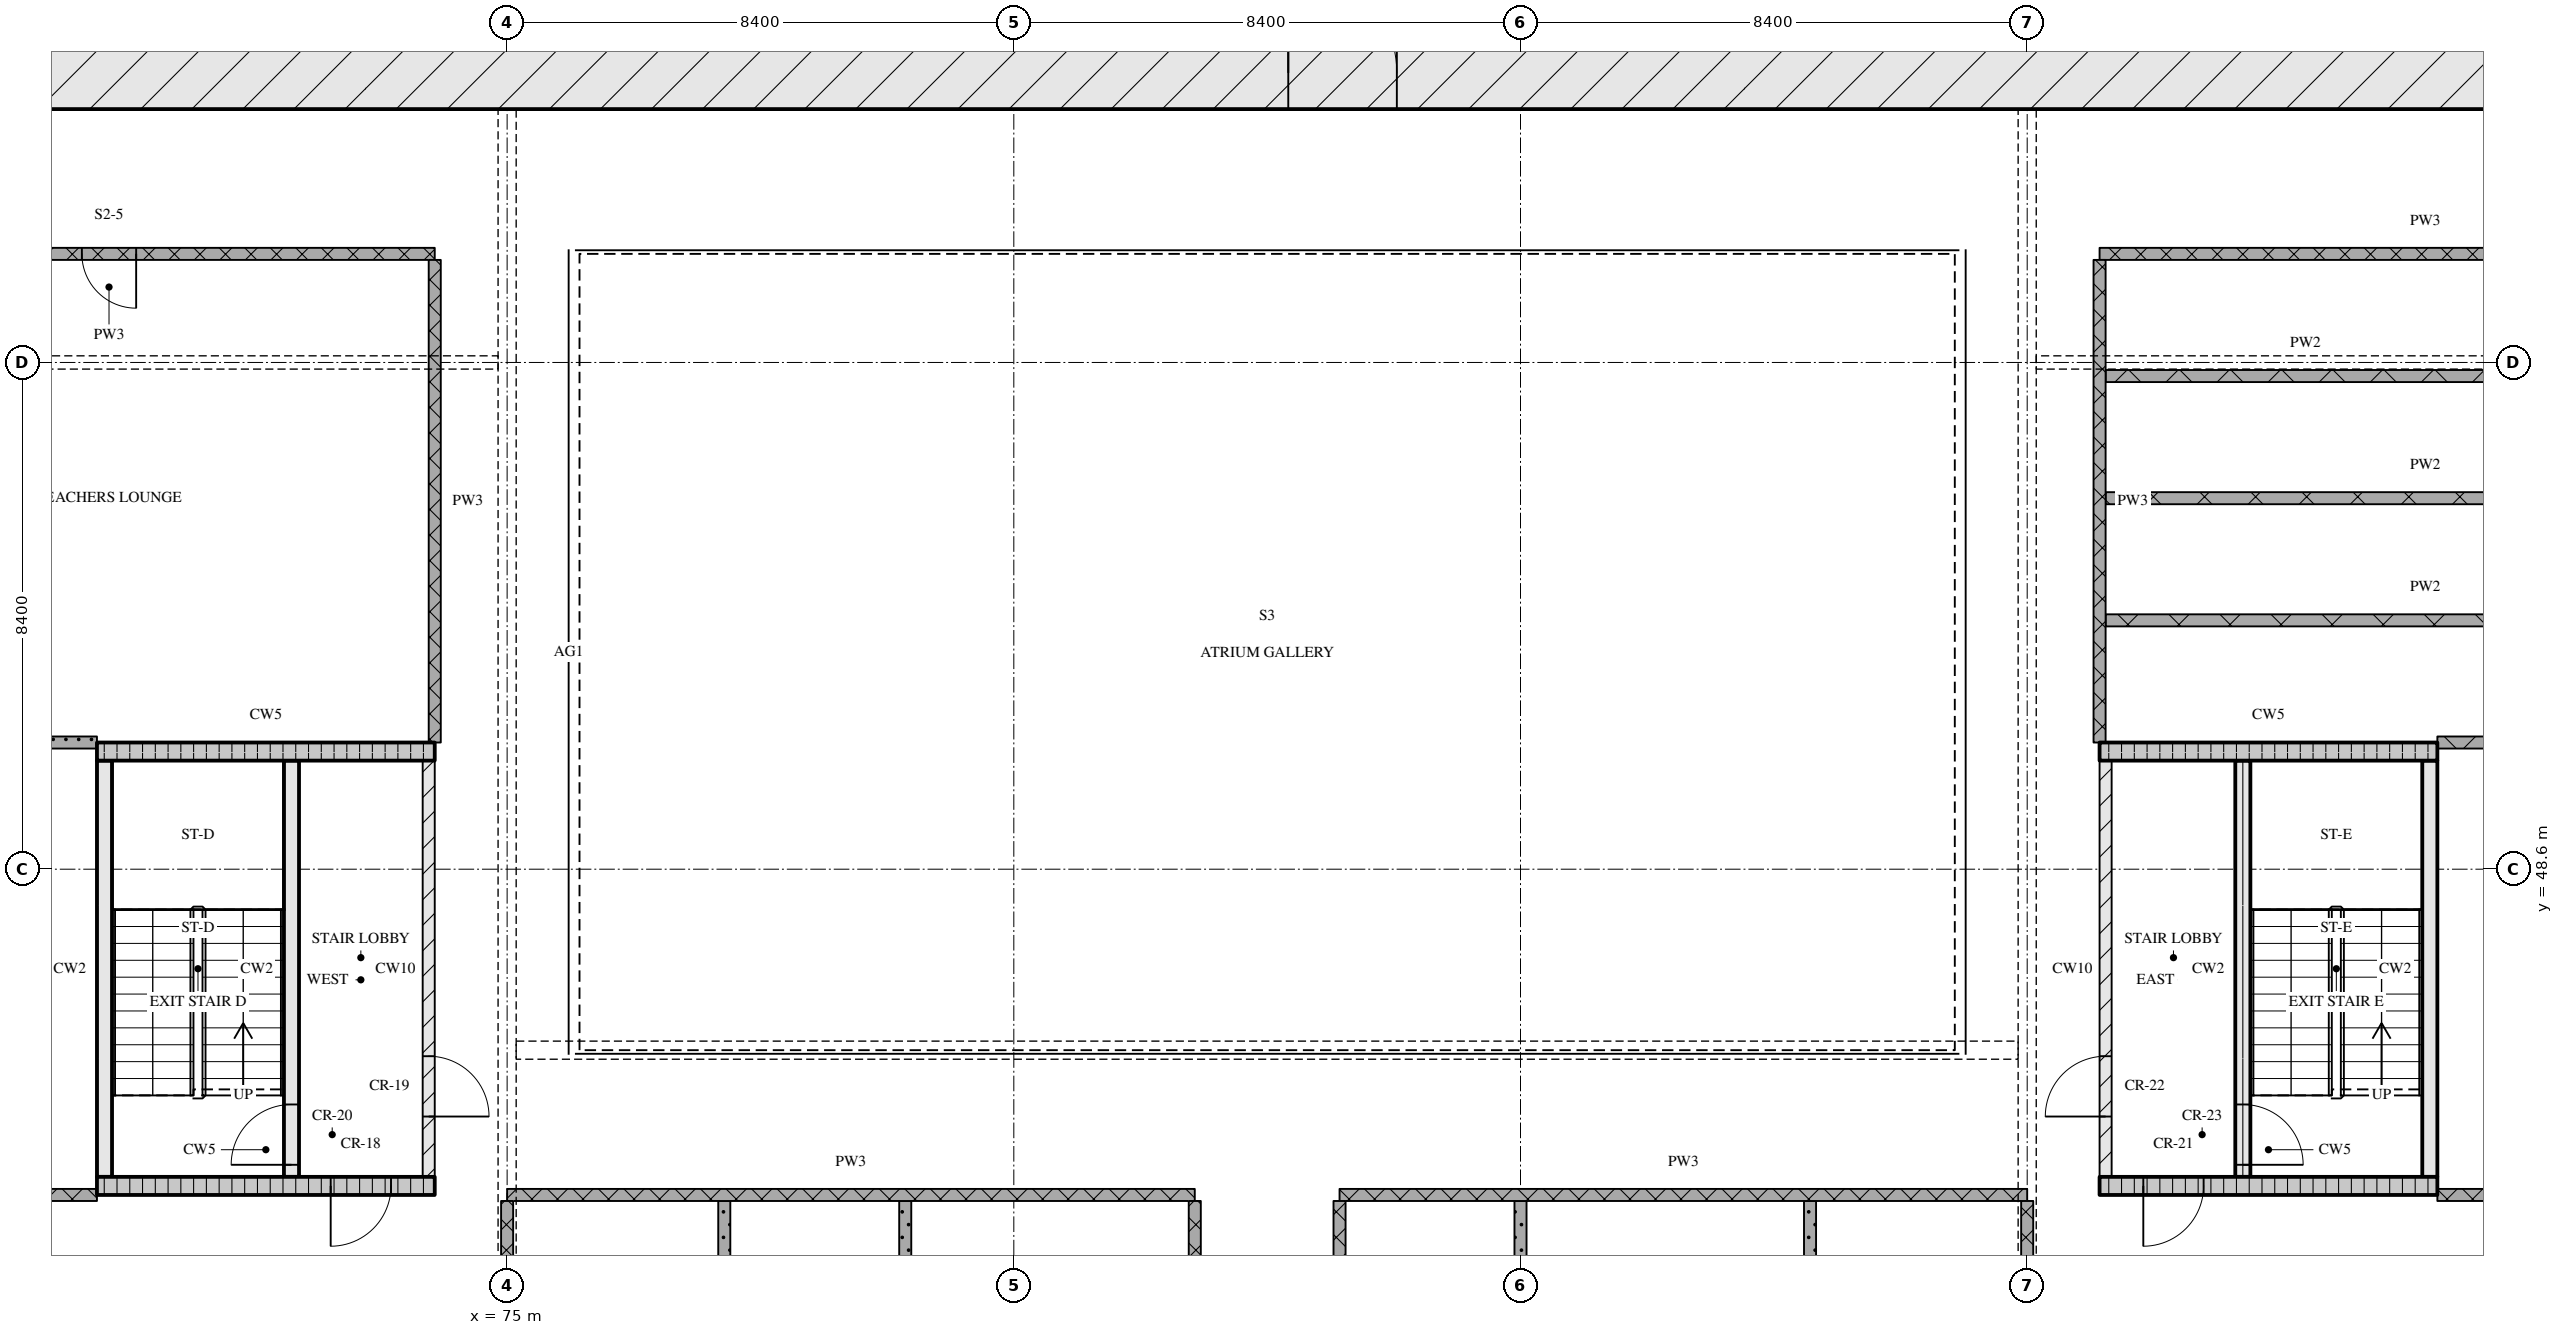
"""IFC4 building model, lengths in metres.
Left out: names, types, materials, properties, quantities, classifications, styles, units other than length and angle.
Written with IfcOpenShell. Run it as: python <this file> out.ifc"""

import sys

from ifc_helpers import new_model, si_unit, direction, frame, frame_2d, origin, place, context, subcontext, project, spatial, rectangle, extrude, element, fill, save


model = new_model("IFC4")
c1 = context("Model", 3, precision=1e-05, world=origin(), true_north=direction((0.0, 1.0)))
c2 = subcontext(c1, "Body", "Model", "MODEL_VIEW")
j1 = project(units=[si_unit("LENGTHUNIT", "METRE"), si_unit("PLANEANGLEUNIT", "RADIAN")], contexts=[c1])
p1 = place(None, origin())
s1 = spatial("IfcSite", under=j1, at=p1, CompositionType="ELEMENT")
p2 = place(p1, origin())
s2 = spatial("IfcBuilding", under=s1, at=p2, CompositionType="ELEMENT")
p3 = place(p2, frame((0.0, 0.0, 28.2)))
s3 = spatial("IfcBuildingStorey", under=s2, at=p3, CompositionType="ELEMENT", Elevation=28.2)
p4 = place(p3, frame((66.6, 61.8, 0.0), z_axis=(0.0, 0.0, 1.0), x_axis=(1.0, 0.0, 0.0)))
e1 = element("IfcWall", 1, at=p4, inside=s3, PredefinedType="SOLIDWALL", context=c2, shape_type="SweptSolid", body=[
    extrude(rectangle(XDim=42.0, YDim=1.2, at=frame_2d((21.0, 0.0))), origin(), (0.0, 0.0, 1.0), 4.2),
])
p5 = place(p4, frame((21.35, 0.0, 0.0)))
e2 = element("IfcOpeningElement", 2, at=p5, cuts=e1, PredefinedType="OPENING", context=c2, shape_type="SweptSolid", body=[
    extrude(rectangle(XDim=1.8, YDim=2.1, at=frame_2d((0.9, 1.05))), frame((0.0, 0.61, 0.0), z_axis=(0.0, -1.0, 0.0), x_axis=(1.0, 0.0, 0.0)), (0.0, 0.0, 1.0), 1.22),
])
p6 = place(p3, frame((68.2, 43.35, 0.0), z_axis=(0.0, 0.0, 1.0), x_axis=(1.0, 0.0, 0.0)))
e3 = element("IfcWall", 3, at=p6, inside=s3, PredefinedType="SOLIDWALL", context=c2, shape_type="SweptSolid", body=[
    extrude(rectangle(XDim=5.6, YDim=0.3, at=frame_2d((2.8, 0.0))), origin(), (0.0, 0.0, 1.0), 4.2),
])
p7 = place(p6, frame((3.875, 0.0, 0.0)))
e4 = element("IfcOpeningElement", 4, at=p7, cuts=e3, PredefinedType="OPENING", context=c2, shape_type="SweptSolid", body=[
    extrude(rectangle(XDim=1.0, YDim=2.1, at=frame_2d((0.5, 1.05))), frame((0.0, 0.16, 0.0), z_axis=(0.0, -1.0, 0.0), x_axis=(1.0, 0.0, 0.0)), (0.0, 0.0, 1.0), 0.32),
])
p8 = place(p3, frame((68.325, 43.5, 0.0), z_axis=(0.0, 0.0, 1.0), x_axis=(0.0, 1.0, 0.0)))
e5 = element("IfcWall", 5, at=p8, inside=s3, PredefinedType="SOLIDWALL", context=c2, shape_type="SweptSolid", body=[
    extrude(rectangle(XDim=6.9, YDim=0.25, at=frame_2d((3.45, 0.0))), origin(), (0.0, 0.0, 1.0), 4.2),
])
p9 = place(p3, frame((71.425, 43.5, 0.0), z_axis=(0.0, 0.0, 1.0), x_axis=(0.0, 1.0, 0.0)))
e6 = element("IfcWall", 6, at=p9, inside=s3, PredefinedType="SOLIDWALL", context=c2, shape_type="SweptSolid", body=[
    extrude(rectangle(XDim=6.9, YDim=0.25, at=frame_2d((3.45, 0.0))), origin(), (0.0, 0.0, 1.0), 4.2),
])
p10 = place(p9, frame((0.2, 0.0, 0.0)))
e7 = element("IfcOpeningElement", 7, at=p10, cuts=e6, PredefinedType="OPENING", context=c2, shape_type="SweptSolid", body=[
    extrude(rectangle(XDim=1.0, YDim=2.1, at=frame_2d((0.5, 1.05))), frame((0.0, 0.135, 0.0), z_axis=(0.0, -1.0, 0.0), x_axis=(1.0, 0.0, 0.0)), (0.0, 0.0, 1.0), 0.27),
])
p11 = place(p3, frame((73.7, 43.5, 0.0), z_axis=(0.0, 0.0, 1.0), x_axis=(0.0, 1.0, 0.0)))
e8 = element("IfcWall", 8, at=p11, inside=s3, PredefinedType="PARTITIONING", context=c2, shape_type="SweptSolid", body=[
    extrude(rectangle(XDim=6.9, YDim=0.2, at=frame_2d((3.45, 0.0))), origin(), (0.0, 0.0, 1.0), 4.2),
])
p12 = place(p11, frame((1.0, 0.0, 0.0)))
e9 = element("IfcOpeningElement", 9, at=p12, cuts=e8, PredefinedType="OPENING", context=c2, shape_type="SweptSolid", body=[
    extrude(rectangle(XDim=1.0, YDim=2.1, at=frame_2d((0.5, 1.05))), frame((0.0, 0.11, 0.0), z_axis=(0.0, -1.0, 0.0), x_axis=(1.0, 0.0, 0.0)), (0.0, 0.0, 1.0), 0.22),
])
p13 = place(p3, frame((68.2, 50.55, 0.0), z_axis=(0.0, 0.0, 1.0), x_axis=(1.0, 0.0, 0.0)))
e10 = element("IfcWall", 10, at=p13, inside=s3, PredefinedType="SOLIDWALL", context=c2, shape_type="SweptSolid", body=[
    extrude(rectangle(XDim=5.6, YDim=0.3, at=frame_2d((2.8, 0.0))), origin(), (0.0, 0.0, 1.0), 4.2),
])
p14 = place(p3, frame((101.4, 43.35, 0.0), z_axis=(0.0, 0.0, 1.0), x_axis=(1.0, 0.0, 0.0)))
e11 = element("IfcWall", 11, at=p14, inside=s3, PredefinedType="SOLIDWALL", context=c2, shape_type="SweptSolid", body=[
    extrude(rectangle(XDim=5.6, YDim=0.3, at=frame_2d((2.8, 0.0))), origin(), (0.0, 0.0, 1.0), 4.2),
])
p15 = place(p14, frame((0.725, 0.0, 0.0)))
e12 = element("IfcOpeningElement", 12, at=p15, cuts=e11, PredefinedType="OPENING", context=c2, shape_type="SweptSolid", body=[
    extrude(rectangle(XDim=1.0, YDim=2.1, at=frame_2d((0.5, 1.05))), frame((0.0, 0.16, 0.0), z_axis=(0.0, -1.0, 0.0), x_axis=(1.0, 0.0, 0.0)), (0.0, 0.0, 1.0), 0.32),
])
p16 = place(p3, frame((101.5, 43.5, 0.0), z_axis=(0.0, 0.0, 1.0), x_axis=(0.0, 1.0, 0.0)))
e13 = element("IfcWall", 13, at=p16, inside=s3, PredefinedType="PARTITIONING", context=c2, shape_type="SweptSolid", body=[
    extrude(rectangle(XDim=6.9, YDim=0.2, at=frame_2d((3.45, 0.0))), origin(), (0.0, 0.0, 1.0), 4.2),
])
p17 = place(p16, frame((1.0, 0.0, 0.0)))
e14 = element("IfcOpeningElement", 14, at=p17, cuts=e13, PredefinedType="OPENING", context=c2, shape_type="SweptSolid", body=[
    extrude(rectangle(XDim=1.0, YDim=2.1, at=frame_2d((0.5, 1.05))), frame((0.0, 0.11, 0.0), z_axis=(0.0, -1.0, 0.0), x_axis=(1.0, 0.0, 0.0)), (0.0, 0.0, 1.0), 0.22),
])
p18 = place(p3, frame((103.775, 43.5, 0.0), z_axis=(0.0, 0.0, 1.0), x_axis=(0.0, 1.0, 0.0)))
e15 = element("IfcWall", 15, at=p18, inside=s3, PredefinedType="SOLIDWALL", context=c2, shape_type="SweptSolid", body=[
    extrude(rectangle(XDim=6.9, YDim=0.25, at=frame_2d((3.45, 0.0))), origin(), (0.0, 0.0, 1.0), 4.2),
])
p19 = place(p18, frame((0.2, 0.0, 0.0)))
e16 = element("IfcOpeningElement", 16, at=p19, cuts=e15, PredefinedType="OPENING", context=c2, shape_type="SweptSolid", body=[
    extrude(rectangle(XDim=1.0, YDim=2.1, at=frame_2d((0.5, 1.05))), frame((0.0, 0.135, 0.0), z_axis=(0.0, -1.0, 0.0), x_axis=(1.0, 0.0, 0.0)), (0.0, 0.0, 1.0), 0.27),
])
p20 = place(p3, frame((106.875, 43.5, 0.0), z_axis=(0.0, 0.0, 1.0), x_axis=(0.0, 1.0, 0.0)))
e17 = element("IfcWall", 17, at=p20, inside=s3, PredefinedType="SOLIDWALL", context=c2, shape_type="SweptSolid", body=[
    extrude(rectangle(XDim=6.9, YDim=0.25, at=frame_2d((3.45, 0.0))), origin(), (0.0, 0.0, 1.0), 4.2),
])
p21 = place(p3, frame((101.4, 50.55, 0.0), z_axis=(0.0, 0.0, 1.0), x_axis=(1.0, 0.0, 0.0)))
e18 = element("IfcWall", 18, at=p21, inside=s3, PredefinedType="SOLIDWALL", context=c2, shape_type="SweptSolid", body=[
    extrude(rectangle(XDim=5.6, YDim=0.3, at=frame_2d((2.8, 0.0))), origin(), (0.0, 0.0, 1.0), 4.2),
])
p22 = place(p3, frame((63.0, 43.2, 0.0), z_axis=(0.0, 0.0, 1.0), x_axis=(1.0, 0.0, 0.0)))
e19 = element("IfcWall", 19, at=p22, inside=s3, PredefinedType="PARTITIONING", context=c2, shape_type="SweptSolid", body=[
    extrude(rectangle(XDim=5.2, YDim=0.2, at=frame_2d((2.6, 0.0))), origin(), (0.0, 0.0, 1.0), 4.2),
])
for number, where, z_axis, x_axis in (
    (20, (75.0, 43.2, 0.0), (0.0, 0.0, 1.0), (1.0, 0.0, 0.0)),
    (21, (88.8, 43.2, 0.0), (0.0, 0.0, 1.0), (1.0, 0.0, 0.0)),
):
    element("IfcWall", number, at=place(p3, frame(where, z_axis=z_axis, x_axis=x_axis)), inside=s3, PredefinedType="PARTITIONING", context=c2, shape_type="SweptSolid", body=[
        extrude(rectangle(XDim=11.4, YDim=0.2, at=frame_2d((5.7, 0.0))), origin(), (0.0, 0.0, 1.0), 4.2),
    ])
p23 = place(p3, frame((107.0, 43.2, 0.0), z_axis=(0.0, 0.0, 1.0), x_axis=(1.0, 0.0, 0.0)))
e22 = element("IfcWall", 22, at=p23, inside=s3, PredefinedType="PARTITIONING", context=c2, shape_type="SweptSolid", body=[
    extrude(rectangle(XDim=5.2, YDim=0.2, at=frame_2d((2.6, 0.0))), origin(), (0.0, 0.0, 1.0), 4.2),
])
p24 = place(p23, frame((2.15, 0.0, 0.0)))
e23 = element("IfcOpeningElement", 23, at=p24, cuts=e22, PredefinedType="OPENING", context=c2, shape_type="SweptSolid", body=[
    extrude(rectangle(XDim=0.9, YDim=2.1, at=frame_2d((0.45, 1.05))), frame((0.0, 0.11, 0.0), z_axis=(0.0, -1.0, 0.0), x_axis=(1.0, 0.0, 0.0)), (0.0, 0.0, 1.0), 0.22),
])
p25 = place(p3, frame((107.0, 50.7, 0.0), z_axis=(0.0, 0.0, 1.0), x_axis=(1.0, 0.0, 0.0)))
e24 = element("IfcWall", 24, at=p25, inside=s3, PredefinedType="PARTITIONING", context=c2, shape_type="SweptSolid", body=[
    extrude(rectangle(XDim=5.1, YDim=0.2, at=frame_2d((2.55, 0.0))), origin(), (0.0, 0.0, 1.0), 4.2),
])
p26 = place(p3, frame((63.1, 50.7, 0.0), z_axis=(0.0, 0.0, 1.0), x_axis=(1.0, 0.0, 0.0)))
e25 = element("IfcWall", 25, at=p26, inside=s3, PredefinedType="PARTITIONING", context=c2, shape_type="SweptSolid", body=[
    extrude(rectangle(XDim=5.1, YDim=0.2, at=frame_2d((2.55, 0.0))), origin(), (0.0, 0.0, 1.0), 4.2),
])
for number, where, z_axis, x_axis in (
    (26, (101.5, 52.725, 0.0), (0.0, 0.0, 1.0), (1.0, 0.0, 0.0)),
    (27, (101.5, 54.75, 0.0), (0.0, 0.0, 1.0), (1.0, 0.0, 0.0)),
):
    element("IfcWall", number, at=place(p3, frame(where, z_axis=z_axis, x_axis=x_axis)), inside=s3, PredefinedType="PARTITIONING", context=c2, shape_type="SweptSolid", body=[
        extrude(rectangle(XDim=10.6, YDim=0.2, at=frame_2d((5.3, 0.0))), origin(), (0.0, 0.0, 1.0), 4.2),
    ])
p27 = place(p3, frame((101.5, 56.775, 0.0), z_axis=(0.0, 0.0, 1.0), x_axis=(1.0, 0.0, 0.0)))
e28 = element("IfcWall", 28, at=p27, inside=s3, PredefinedType="PARTITIONING", context=c2, shape_type="SweptSolid", body=[
    extrude(rectangle(XDim=6.63, YDim=0.2, at=frame_2d((3.315, 0.0))), origin(), (0.0, 0.0, 1.0), 4.2),
])
p28 = place(p3, frame((73.8, 58.8, 0.0), z_axis=(0.0, 0.0, 1.0), x_axis=(-1.0, 0.0, 0.0)))
e29 = element("IfcWall", 29, at=p28, inside=s3, PredefinedType="PARTITIONING", context=c2, shape_type="SweptSolid", body=[
    extrude(rectangle(XDim=10.8, YDim=0.2, at=frame_2d((5.4, 0.0))), origin(), (0.0, 0.0, 1.0), 4.2),
])
p29 = place(p28, frame((4.95, 0.0, 0.0)))
e30 = element("IfcOpeningElement", 30, at=p29, cuts=e29, PredefinedType="OPENING", context=c2, shape_type="SweptSolid", body=[
    extrude(rectangle(XDim=0.9, YDim=2.1, at=frame_2d((0.45, 1.05))), frame((0.0, 0.11, 0.0), z_axis=(0.0, -1.0, 0.0), x_axis=(1.0, 0.0, 0.0)), (0.0, 0.0, 1.0), 0.22),
])
p30 = place(p3, frame((101.4, 58.8, 0.0), z_axis=(0.0, 0.0, 1.0), x_axis=(1.0, 0.0, 0.0)))
e31 = element("IfcWall", 31, at=p30, inside=s3, PredefinedType="PARTITIONING", context=c2, shape_type="SweptSolid", body=[
    extrude(rectangle(XDim=10.8, YDim=0.2, at=frame_2d((5.4, 0.0))), origin(), (0.0, 0.0, 1.0), 4.2),
])
p31 = place(p3, frame((73.8, 58.7, 0.0), z_axis=(0.0, 0.0, 1.0), x_axis=(0.0, -1.0, 0.0)))
e32 = element("IfcWall", 32, at=p31, inside=s3, PredefinedType="PARTITIONING", context=c2, shape_type="SweptSolid", body=[
    extrude(rectangle(XDim=8.0, YDim=0.2, at=frame_2d((4.0, 0.0))), origin(), (0.0, 0.0, 1.0), 4.2),
])
p32 = place(p3, frame((75.0, 43.1, 0.0), z_axis=(0.0, 0.0, 1.0), x_axis=(0.0, -1.0, 0.0)))
e33 = element("IfcWall", 33, at=p32, inside=s3, PredefinedType="PARTITIONING", context=c2, shape_type="SweptSolid", body=[
    extrude(rectangle(XDim=2.2, YDim=0.2, at=frame_2d((1.1, 0.0))), origin(), (0.0, 0.0, 1.0), 3.3),
])
for number, where, z_axis, x_axis in (
    (34, (78.6, 43.1, 0.0), (0.0, 0.0, 1.0), (0.0, -1.0, 0.0)),
    (35, (81.6, 43.1, 0.0), (0.0, 0.0, 1.0), (0.0, -1.0, 0.0)),
    (36, (86.4, 43.1, 0.0), (0.0, 0.0, 1.0), (0.0, -1.0, 0.0)),
):
    element("IfcWall", number, at=place(p3, frame(where, z_axis=z_axis, x_axis=x_axis)), inside=s3, PredefinedType="PARTITIONING", context=c2, shape_type="SweptSolid", body=[
        extrude(rectangle(XDim=4.6, YDim=0.2, at=frame_2d((2.3, 0.0))), origin(), (0.0, 0.0, 1.0), 4.2),
    ])
p33 = place(p3, frame((88.8, 43.1, 0.0), z_axis=(0.0, 0.0, 1.0), x_axis=(0.0, -1.0, 0.0)))
e37 = element("IfcWall", 37, at=p33, inside=s3, PredefinedType="PARTITIONING", context=c2, shape_type="SweptSolid", body=[
    extrude(rectangle(XDim=4.6, YDim=0.2, at=frame_2d((2.3, 0.0))), origin(), (0.0, 0.0, 1.0), 4.2),
])
p34 = place(p33, frame((1.85, 0.0, 0.0)))
e38 = element("IfcOpeningElement", 38, at=p34, cuts=e37, PredefinedType="OPENING", context=c2, shape_type="SweptSolid", body=[
    extrude(rectangle(XDim=0.9, YDim=2.1, at=frame_2d((0.45, 1.05))), frame((0.0, 0.11, 0.0), z_axis=(0.0, -1.0, 0.0), x_axis=(1.0, 0.0, 0.0)), (0.0, 0.0, 1.0), 0.22),
])
p35 = place(p3, frame((91.8, 43.1, 0.0), z_axis=(0.0, 0.0, 1.0), x_axis=(0.0, -1.0, 0.0)))
e39 = element("IfcWall", 39, at=p35, inside=s3, PredefinedType="PARTITIONING", context=c2, shape_type="SweptSolid", body=[
    extrude(rectangle(XDim=2.43, YDim=0.2, at=frame_2d((1.215, 0.0))), origin(), (0.0, 0.0, 1.0), 4.2),
])
p36 = place(p3, frame((96.6, 43.1, 0.0), z_axis=(0.0, 0.0, 1.0), x_axis=(0.0, -1.0, 0.0)))
e40 = element("IfcWall", 40, at=p36, inside=s3, PredefinedType="PARTITIONING", context=c2, shape_type="SweptSolid", body=[
    extrude(rectangle(XDim=4.6, YDim=0.2, at=frame_2d((2.3, 0.0))), origin(), (0.0, 0.0, 1.0), 4.2),
])
p37 = place(p3, frame((100.2, 43.1, 0.0), z_axis=(0.0, 0.0, 1.0), x_axis=(0.0, -1.0, 0.0)))
e41 = element("IfcWall", 41, at=p37, inside=s3, PredefinedType="PARTITIONING", context=c2, shape_type="SweptSolid", body=[
    extrude(rectangle(XDim=2.2, YDim=0.2, at=frame_2d((1.1, 0.0))), origin(), (0.0, 0.0, 1.0), 3.3),
])
p38 = place(p3, frame((101.4, 58.7, 0.0), z_axis=(0.0, 0.0, 1.0), x_axis=(0.0, -1.0, 0.0)))
e42 = element("IfcWall", 42, at=p38, inside=s3, PredefinedType="PARTITIONING", context=c2, shape_type="SweptSolid", body=[
    extrude(rectangle(XDim=8.0, YDim=0.2, at=frame_2d((4.0, 0.0))), origin(), (0.0, 0.0, 1.0), 4.2),
])
p39 = place(p5, origin())
e43 = element("IfcDoor", 43, at=p39, inside=s3, OperationType="DOUBLE_DOOR_SINGLE_SWING", PredefinedType="DOOR", context=c2, shape_type="SweptSolid", body=[
    extrude(rectangle(XDim=1.8, YDim=2.1, at=frame_2d((0.9, 1.05))), frame((0.0, 0.025, 0.0), z_axis=(0.0, -1.0, 0.0), x_axis=(1.0, 0.0, 0.0)), (0.0, 0.0, 1.0), 0.05),
])
fill(e2, e43)
p40 = place(p7, origin())
e44 = element("IfcDoor", 44, at=p40, inside=s3, OperationType="SINGLE_SWING_RIGHT", PredefinedType="DOOR", context=c2, shape_type="SweptSolid", body=[
    extrude(rectangle(XDim=1.0, YDim=2.1, at=frame_2d((0.5, 1.05))), frame((0.0, 0.025, 0.0), z_axis=(0.0, -1.0, 0.0), x_axis=(1.0, 0.0, 0.0)), (0.0, 0.0, 1.0), 0.05),
])
fill(e4, e44)
p41 = place(p10, origin())
e45 = element("IfcDoor", 45, at=p41, inside=s3, OperationType="SINGLE_SWING_LEFT", PredefinedType="DOOR", context=c2, shape_type="SweptSolid", body=[
    extrude(rectangle(XDim=1.0, YDim=2.1, at=frame_2d((0.5, 1.05))), frame((0.0, 0.025, 0.0), z_axis=(0.0, -1.0, 0.0), x_axis=(1.0, 0.0, 0.0)), (0.0, 0.0, 1.0), 0.05),
])
fill(e7, e45)
p42 = place(p12, origin())
e46 = element("IfcDoor", 46, at=p42, inside=s3, OperationType="SINGLE_SWING_RIGHT", PredefinedType="DOOR", context=c2, shape_type="SweptSolid", body=[
    extrude(rectangle(XDim=1.0, YDim=2.1, at=frame_2d((0.5, 1.05))), frame((0.0, 0.025, 0.0), z_axis=(0.0, -1.0, 0.0), x_axis=(1.0, 0.0, 0.0)), (0.0, 0.0, 1.0), 0.05),
])
fill(e9, e46)
p43 = place(p15, origin())
e47 = element("IfcDoor", 47, at=p43, inside=s3, OperationType="SINGLE_SWING_RIGHT", PredefinedType="DOOR", context=c2, shape_type="SweptSolid", body=[
    extrude(rectangle(XDim=1.0, YDim=2.1, at=frame_2d((0.5, 1.05))), frame((0.0, 0.025, 0.0), z_axis=(0.0, -1.0, 0.0), x_axis=(1.0, 0.0, 0.0)), (0.0, 0.0, 1.0), 0.05),
])
fill(e12, e47)
p44 = place(p19, origin())
e48 = element("IfcDoor", 48, at=p44, inside=s3, OperationType="SINGLE_SWING_RIGHT", PredefinedType="DOOR", context=c2, shape_type="SweptSolid", body=[
    extrude(rectangle(XDim=1.0, YDim=2.1, at=frame_2d((0.5, 1.05))), frame((0.0, 0.025, 0.0), z_axis=(0.0, -1.0, 0.0), x_axis=(1.0, 0.0, 0.0)), (0.0, 0.0, 1.0), 0.05),
])
fill(e16, e48)
p45 = place(p17, origin())
e49 = element("IfcDoor", 49, at=p45, inside=s3, OperationType="SINGLE_SWING_LEFT", PredefinedType="DOOR", context=c2, shape_type="SweptSolid", body=[
    extrude(rectangle(XDim=1.0, YDim=2.1, at=frame_2d((0.5, 1.05))), frame((0.0, 0.025, 0.0), z_axis=(0.0, -1.0, 0.0), x_axis=(1.0, 0.0, 0.0)), (0.0, 0.0, 1.0), 0.05),
])
fill(e14, e49)
p46 = place(p29, origin())
e50 = element("IfcDoor", 50, at=p46, inside=s3, OperationType="SINGLE_SWING_LEFT", PredefinedType="DOOR", context=c2, shape_type="SweptSolid", body=[
    extrude(rectangle(XDim=0.9, YDim=2.1, at=frame_2d((0.45, 1.05))), frame((0.0, 0.025, 0.0), z_axis=(0.0, -1.0, 0.0), x_axis=(1.0, 0.0, 0.0)), (0.0, 0.0, 1.0), 0.05),
])
fill(e30, e50)
save(model, sys.argv[1])
